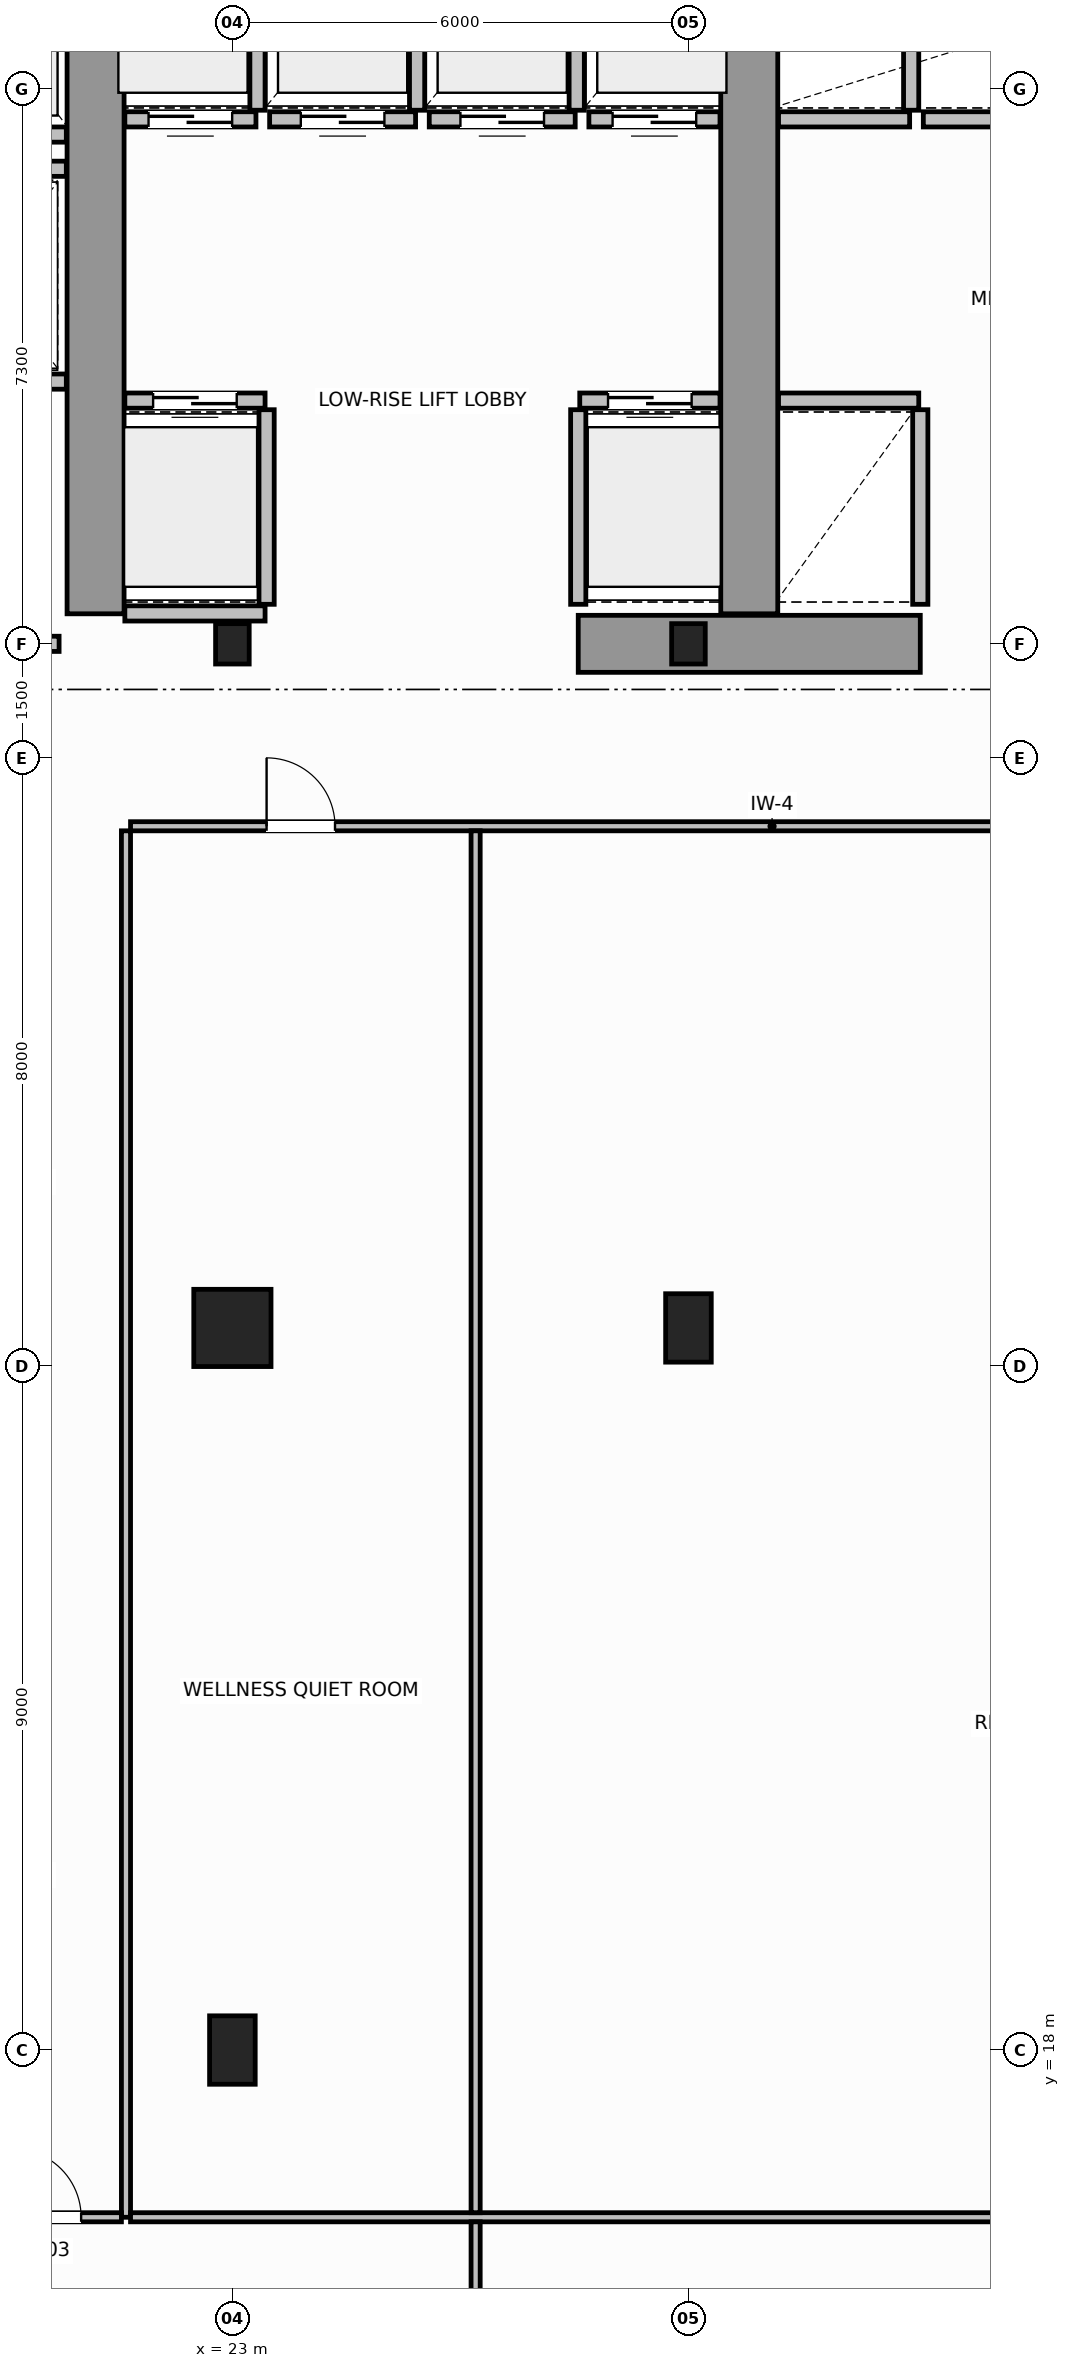
"""IFC4 building model, lengths in metres.
Left out: names, types, materials, properties, quantities, classifications, styles, units other than length and angle.
Written with IfcOpenShell. Run it as: python <this file> out.ifc"""

import sys

from ifc_helpers import new_model, si_unit, direction, frame, frame_2d, origin, origin_2d, place, context, subcontext, project, spatial, rectangle, hollow_rectangle, hollow_circle, i_section, extrude, source, transform, mapped, element, fill, save


model = new_model("IFC4")
c1 = context("Model", 3, precision=1e-05, world=origin(), true_north=direction((0.0, 1.0)))
c2 = subcontext(c1, "Body", "Model", "MODEL_VIEW")
j1 = project(units=[si_unit("LENGTHUNIT", "METRE"), si_unit("PLANEANGLEUNIT", "RADIAN")], contexts=[c1])
p1 = place(None, origin())
s1 = spatial("IfcSite", under=j1, at=p1, CompositionType="ELEMENT")
p2 = place(p1, origin())
s2 = spatial("IfcBuilding", under=s1, at=p2, CompositionType="ELEMENT")
p3 = place(p2, frame((0.0, 0.0, 88.2)))
s3 = spatial("IfcBuildingStorey", under=s2, at=p3, CompositionType="ELEMENT", Elevation=88.2)
m1 = source(origin(), c2, "Body", "SweptSolid", [
    extrude(i_section(OverallWidth=0.442, OverallDepth=0.531, WebThickness=0.065, FlangeThickness=0.076, FilletRadius=0.015, at=origin_2d()), origin(), (0.0, 0.0, 1.0), 3.8),
])
for number, where, z_axis, x_axis in (
    (1, (23.0, 36.5, 0.0), (0.0, 0.0, 1.0), (1.0, 0.0, 0.0)),
    (2, (29.0, 36.5, 0.0), (0.0, 0.0, 1.0), (1.0, 0.0, 0.0)),
):
    element("IfcColumn", number, at=place(p3, frame(where, z_axis=z_axis, x_axis=x_axis)), inside=s3, PredefinedType="COLUMN", context=c2, shape_type="MappedRepresentation", body=[
        mapped(m1, transform((0.0, 0.0, 0.0), scale=1.0)),
    ])
m2 = source(origin(), c2, "Body", "SweptSolid", [
    extrude(hollow_circle(Radius=0.508, WallThickness=0.045, at=origin_2d()), origin(), (0.0, 0.0, 1.0), 3.8),
])
p4 = place(p3, frame((23.0, 27.5, 0.0), z_axis=(0.0, 0.0, 1.0), x_axis=(1.0, 0.0, 0.0)))
e3 = element("IfcColumn", 3, at=p4, inside=s3, PredefinedType="COLUMN", context=c2, shape_type="MappedRepresentation", body=[
    mapped(m2, transform((0.0, 0.0, 0.0), scale=1.0)),
])
m3 = source(origin(), c2, "Body", "SweptSolid", [
    extrude(hollow_rectangle(XDim=0.6, YDim=0.9, WallThickness=0.04, InnerFilletRadius=0.04, OuterFilletRadius=0.08, at=origin_2d()), origin(), (0.0, 0.0, 1.0), 3.8),
])
for number, where, z_axis, x_axis in (
    (4, (29.0, 27.5, 0.0), (0.0, 0.0, 1.0), (1.0, 0.0, 0.0)),
    (5, (23.0, 18.0, 0.0), (0.0, 0.0, 1.0), (1.0, 0.0, 0.0)),
):
    element("IfcColumn", number, at=place(p3, frame(where, z_axis=z_axis, x_axis=x_axis)), inside=s3, PredefinedType="COLUMN", context=c2, shape_type="MappedRepresentation", body=[
        mapped(m3, transform((0.0, 0.0, 0.0), scale=1.0)),
    ])
p5 = place(p3, frame((27.55, 36.5, 0.0), z_axis=(0.0, 0.0, 1.0), x_axis=(1.0, 0.0, 0.0)))
e6 = element("IfcWall", 6, at=p5, inside=s3, PredefinedType="SHEAR", context=c2, shape_type="SweptSolid", body=[
    extrude(rectangle(XDim=4.5, YDim=0.75, at=frame_2d((2.25, 0.0))), origin(), (0.0, 0.0, 1.0), 3.8),
])
for number, where, z_axis, x_axis in (
    (7, (21.2, 36.895, 0.0), (0.0, 0.0, 1.0), (0.0, 1.0, 0.0)),
    (8, (29.8, 36.895, 0.0), (0.0, 0.0, 1.0), (0.0, 1.0, 0.0)),
):
    element("IfcWall", number, at=place(p3, frame(where, z_axis=z_axis, x_axis=x_axis)), inside=s3, PredefinedType="SHEAR", context=c2, shape_type="SweptSolid", body=[
        extrude(rectangle(XDim=9.305, YDim=0.75, at=frame_2d((4.652, 0.0))), origin(), (0.0, 0.0, 1.0), 3.8),
    ])
p6 = place(p3, frame((18.25, 36.5, 0.0), z_axis=(0.0, 0.0, 1.0), x_axis=(1.0, 0.0, 0.0)))
e9 = element("IfcWall", 9, at=p6, inside=s3, PredefinedType="SOLIDWALL", context=c2, shape_type="SweptSolid", body=[
    extrude(rectangle(XDim=2.47, YDim=0.2, at=frame_2d((1.235, 0.0))), origin(), (0.0, 0.0, 1.0), 2.37),
])
p7 = place(p6, frame((0.65, 0.0, 0.0)))
e10 = element("IfcOpeningElement", 10, at=p7, cuts=e9, PredefinedType="OPENING", context=c2, shape_type="SweptSolid", body=[
    extrude(rectangle(XDim=1.1, YDim=2.15, at=frame_2d((0.55, 1.075))), frame((0.0, 0.11, 0.0), z_axis=(0.0, -1.0, 0.0), x_axis=(1.0, 0.0, 0.0)), (0.0, 0.0, 1.0), 0.22),
])
p8 = place(p3, frame((21.585, 39.7, 0.0), z_axis=(0.0, 0.0, 1.0), x_axis=(1.0, 0.0, 0.0)))
e11 = element("IfcWall", 11, at=p8, inside=s3, PredefinedType="SOLIDWALL", context=c2, shape_type="SweptSolid", body=[
    extrude(rectangle(XDim=1.845, YDim=0.2, at=frame_2d((0.922, 0.0))), origin(), (0.0, 0.0, 1.0), 3.58),
])
p9 = place(p8, frame((0.372, 0.0, 0.0)))
e12 = element("IfcOpeningElement", 12, at=p9, cuts=e11, PredefinedType="OPENING", context=c2, shape_type="SweptSolid", body=[
    extrude(rectangle(XDim=1.1, YDim=2.15, at=frame_2d((0.55, 1.075))), frame((0.0, 0.11, 0.0), z_axis=(0.0, -1.0, 0.0), x_axis=(1.0, 0.0, 0.0)), (0.0, 0.0, 1.0), 0.22),
])
p10 = place(p3, frame((21.585, 36.9, 0.0), z_axis=(0.0, 0.0, 1.0), x_axis=(1.0, 0.0, 0.0)))
e13 = element("IfcWall", 13, at=p10, inside=s3, PredefinedType="SOLIDWALL", context=c2, shape_type="SweptSolid", body=[
    extrude(rectangle(XDim=1.845, YDim=0.2, at=frame_2d((0.922, 0.0))), origin(), (0.0, 0.0, 1.0), 2.37),
])
p11 = place(p3, frame((23.45, 37.02, 0.0), z_axis=(0.0, 0.0, 1.0), x_axis=(0.0, 1.0, 0.0)))
e14 = element("IfcWall", 14, at=p11, inside=s3, PredefinedType="SOLIDWALL", context=c2, shape_type="SweptSolid", body=[
    extrude(rectangle(XDim=2.56, YDim=0.2, at=frame_2d((1.28, 0.0))), origin(), (0.0, 0.0, 1.0), 3.58),
])
p12 = place(p3, frame((27.57, 39.7, 0.0), z_axis=(0.0, 0.0, 1.0), x_axis=(1.0, 0.0, 0.0)))
e15 = element("IfcWall", 15, at=p12, inside=s3, PredefinedType="SOLIDWALL", context=c2, shape_type="SweptSolid", body=[
    extrude(rectangle(XDim=1.845, YDim=0.2, at=frame_2d((0.922, 0.0))), origin(), (0.0, 0.0, 1.0), 3.58),
])
p13 = place(p12, frame((0.372, 0.0, 0.0)))
e16 = element("IfcOpeningElement", 16, at=p13, cuts=e15, PredefinedType="OPENING", context=c2, shape_type="SweptSolid", body=[
    extrude(rectangle(XDim=1.1, YDim=2.15, at=frame_2d((0.55, 1.075))), frame((0.0, 0.11, 0.0), z_axis=(0.0, -1.0, 0.0), x_axis=(1.0, 0.0, 0.0)), (0.0, 0.0, 1.0), 0.22),
])
p14 = place(p3, frame((27.55, 37.02, 0.0), z_axis=(0.0, 0.0, 1.0), x_axis=(0.0, 1.0, 0.0)))
e17 = element("IfcWall", 17, at=p14, inside=s3, PredefinedType="SOLIDWALL", context=c2, shape_type="SweptSolid", body=[
    extrude(rectangle(XDim=2.56, YDim=0.2, at=frame_2d((1.28, 0.0))), origin(), (0.0, 0.0, 1.0), 3.58),
])
p15 = place(p3, frame((21.585, 43.4, 0.0), z_axis=(0.0, 0.0, 1.0), x_axis=(1.0, 0.0, 0.0)))
e18 = element("IfcWall", 18, at=p15, inside=s3, PredefinedType="SOLIDWALL", context=c2, shape_type="SweptSolid", body=[
    extrude(rectangle(XDim=1.725, YDim=0.2, at=frame_2d((0.863, 0.0))), origin(), (0.0, 0.0, 1.0), 3.58),
])
p16 = place(p15, frame((0.312, 0.0, 0.0)))
e19 = element("IfcOpeningElement", 19, at=p16, cuts=e18, PredefinedType="OPENING", context=c2, shape_type="SweptSolid", body=[
    extrude(rectangle(XDim=1.1, YDim=2.15, at=frame_2d((0.55, 1.075))), frame((0.0, 0.11, 0.0), z_axis=(0.0, -1.0, 0.0), x_axis=(1.0, 0.0, 0.0)), (0.0, 0.0, 1.0), 0.22),
])
p17 = place(p3, frame((23.33, 43.52, 0.0), z_axis=(0.0, 0.0, 1.0), x_axis=(0.0, 1.0, 0.0)))
e20 = element("IfcWall", 20, at=p17, inside=s3, PredefinedType="SOLIDWALL", context=c2, shape_type="SweptSolid", body=[
    extrude(rectangle(XDim=2.56, YDim=0.2, at=frame_2d((1.28, 0.0))), origin(), (0.0, 0.0, 1.0), 3.58),
])
p18 = place(p3, frame((23.49, 43.4, 0.0), z_axis=(0.0, 0.0, 1.0), x_axis=(1.0, 0.0, 0.0)))
e21 = element("IfcWall", 21, at=p18, inside=s3, PredefinedType="SOLIDWALL", context=c2, shape_type="SweptSolid", body=[
    extrude(rectangle(XDim=1.92, YDim=0.2, at=frame_2d((0.96, 0.0))), origin(), (0.0, 0.0, 1.0), 3.58),
])
p19 = place(p18, frame((0.41, 0.0, 0.0)))
e22 = element("IfcOpeningElement", 22, at=p19, cuts=e21, PredefinedType="OPENING", context=c2, shape_type="SweptSolid", body=[
    extrude(rectangle(XDim=1.1, YDim=2.15, at=frame_2d((0.55, 1.075))), frame((0.0, 0.11, 0.0), z_axis=(0.0, -1.0, 0.0), x_axis=(1.0, 0.0, 0.0)), (0.0, 0.0, 1.0), 0.22),
])
p20 = place(p3, frame((25.43, 43.52, 0.0), z_axis=(0.0, 0.0, 1.0), x_axis=(0.0, 1.0, 0.0)))
e23 = element("IfcWall", 23, at=p20, inside=s3, PredefinedType="SOLIDWALL", context=c2, shape_type="SweptSolid", body=[
    extrude(rectangle(XDim=2.56, YDim=0.2, at=frame_2d((1.28, 0.0))), origin(), (0.0, 0.0, 1.0), 3.58),
])
p21 = place(p3, frame((25.59, 43.4, 0.0), z_axis=(0.0, 0.0, 1.0), x_axis=(1.0, 0.0, 0.0)))
e24 = element("IfcWall", 24, at=p21, inside=s3, PredefinedType="SOLIDWALL", context=c2, shape_type="SweptSolid", body=[
    extrude(rectangle(XDim=1.92, YDim=0.2, at=frame_2d((0.96, 0.0))), origin(), (0.0, 0.0, 1.0), 3.58),
])
p22 = place(p21, frame((0.41, 0.0, 0.0)))
e25 = element("IfcOpeningElement", 25, at=p22, cuts=e24, PredefinedType="OPENING", context=c2, shape_type="SweptSolid", body=[
    extrude(rectangle(XDim=1.1, YDim=2.15, at=frame_2d((0.55, 1.075))), frame((0.0, 0.11, 0.0), z_axis=(0.0, -1.0, 0.0), x_axis=(1.0, 0.0, 0.0)), (0.0, 0.0, 1.0), 0.22),
])
p23 = place(p3, frame((27.53, 43.52, 0.0), z_axis=(0.0, 0.0, 1.0), x_axis=(0.0, 1.0, 0.0)))
e26 = element("IfcWall", 26, at=p23, inside=s3, PredefinedType="SOLIDWALL", context=c2, shape_type="SweptSolid", body=[
    extrude(rectangle(XDim=2.56, YDim=0.2, at=frame_2d((1.28, 0.0))), origin(), (0.0, 0.0, 1.0), 3.58),
])
p24 = place(p3, frame((27.69, 43.4, 0.0), z_axis=(0.0, 0.0, 1.0), x_axis=(1.0, 0.0, 0.0)))
e27 = element("IfcWall", 27, at=p24, inside=s3, PredefinedType="SOLIDWALL", context=c2, shape_type="SweptSolid", body=[
    extrude(rectangle(XDim=1.725, YDim=0.2, at=frame_2d((0.863, 0.0))), origin(), (0.0, 0.0, 1.0), 3.58),
])
p25 = place(p24, frame((0.312, 0.0, 0.0)))
e28 = element("IfcOpeningElement", 28, at=p25, cuts=e27, PredefinedType="OPENING", context=c2, shape_type="SweptSolid", body=[
    extrude(rectangle(XDim=1.1, YDim=2.15, at=frame_2d((0.55, 1.075))), frame((0.0, 0.11, 0.0), z_axis=(0.0, -1.0, 0.0), x_axis=(1.0, 0.0, 0.0)), (0.0, 0.0, 1.0), 0.22),
])
p26 = place(p3, frame((30.185, 39.7, 0.0), z_axis=(0.0, 0.0, 1.0), x_axis=(1.0, 0.0, 0.0)))
e29 = element("IfcWall", 29, at=p26, inside=s3, PredefinedType="SOLIDWALL", context=c2, shape_type="SweptSolid", body=[
    extrude(rectangle(XDim=1.845, YDim=0.2, at=frame_2d((0.922, 0.0))), origin(), (0.0, 0.0, 1.0), 3.58),
])
p27 = place(p3, frame((32.05, 37.02, 0.0), z_axis=(0.0, 0.0, 1.0), x_axis=(0.0, 1.0, 0.0)))
e30 = element("IfcWall", 30, at=p27, inside=s3, PredefinedType="SOLIDWALL", context=c2, shape_type="SweptSolid", body=[
    extrude(rectangle(XDim=2.56, YDim=0.2, at=frame_2d((1.28, 0.0))), origin(), (0.0, 0.0, 1.0), 3.58),
])
p28 = place(p3, frame((30.185, 43.4, 0.0), z_axis=(0.0, 0.0, 1.0), x_axis=(1.0, 0.0, 0.0)))
e31 = element("IfcWall", 31, at=p28, inside=s3, PredefinedType="SOLIDWALL", context=c2, shape_type="SweptSolid", body=[
    extrude(rectangle(XDim=1.725, YDim=0.2, at=frame_2d((0.862, 0.0))), origin(), (0.0, 0.0, 1.0), 3.58),
])
p29 = place(p3, frame((31.93, 43.52, 0.0), z_axis=(0.0, 0.0, 1.0), x_axis=(0.0, 1.0, 0.0)))
e32 = element("IfcWall", 32, at=p29, inside=s3, PredefinedType="SOLIDWALL", context=c2, shape_type="SweptSolid", body=[
    extrude(rectangle(XDim=2.56, YDim=0.2, at=frame_2d((1.28, 0.0))), origin(), (0.0, 0.0, 1.0), 3.58),
])
p30 = place(p3, frame((32.09, 43.4, 0.0), z_axis=(0.0, 0.0, 1.0), x_axis=(1.0, 0.0, 0.0)))
e33 = element("IfcWall", 33, at=p30, inside=s3, PredefinedType="SOLIDWALL", context=c2, shape_type="SweptSolid", body=[
    extrude(rectangle(XDim=1.92, YDim=0.2, at=frame_2d((0.96, 0.0))), origin(), (0.0, 0.0, 1.0), 3.58),
])
p31 = place(p3, frame((18.67, 43.2, 0.0), z_axis=(0.0, 0.0, 1.0), x_axis=(1.0, 0.0, 0.0)))
e34 = element("IfcWall", 34, at=p31, inside=s3, PredefinedType="SOLIDWALL", context=c2, shape_type="SweptSolid", body=[
    extrude(rectangle(XDim=2.145, YDim=0.2, at=frame_2d((1.073, 0.0))), origin(), (0.0, 0.0, 1.0), 3.58),
])
p32 = place(p3, frame((18.67, 39.95, 0.0), z_axis=(0.0, 0.0, 1.0), x_axis=(1.0, 0.0, 0.0)))
e35 = element("IfcWall", 35, at=p32, inside=s3, PredefinedType="SOLIDWALL", context=c2, shape_type="SweptSolid", body=[
    extrude(rectangle(XDim=2.145, YDim=0.2, at=frame_2d((1.073, 0.0))), origin(), (0.0, 0.0, 1.0), 3.58),
])
p33 = place(p32, frame((0.522, 0.0, 0.0)))
e36 = element("IfcOpeningElement", 36, at=p33, cuts=e35, PredefinedType="OPENING", context=c2, shape_type="SweptSolid", body=[
    extrude(rectangle(XDim=1.1, YDim=2.15, at=frame_2d((0.55, 1.075))), frame((0.0, 0.11, 0.0), z_axis=(0.0, -1.0, 0.0), x_axis=(1.0, 0.0, 0.0)), (0.0, 0.0, 1.0), 0.22),
])
p34 = place(p3, frame((18.67, 42.75, 0.0), z_axis=(0.0, 0.0, 1.0), x_axis=(1.0, 0.0, 0.0)))
e37 = element("IfcWall", 37, at=p34, inside=s3, PredefinedType="SOLIDWALL", context=c2, shape_type="SweptSolid", body=[
    extrude(rectangle(XDim=2.145, YDim=0.2, at=frame_2d((1.073, 0.0))), origin(), (0.0, 0.0, 1.0), 3.58),
])
p35 = place(p3, frame((21.66, 34.1, 0.0), z_axis=(0.0, 0.0, 1.0), x_axis=(1.0, 0.0, 0.0)))
e38 = element("IfcWall", 38, at=p35, inside=s3, PredefinedType="PARTITIONING", context=c2, shape_type="SweptSolid", body=[
    extrude(rectangle(XDim=24.68, YDim=0.12, at=frame_2d((12.34, 0.0))), origin(), (0.0, 0.0, 1.0), 3.58),
])
p36 = place(p35, frame((1.79, 0.0, 0.0)))
e39 = element("IfcOpeningElement", 39, at=p36, cuts=e38, PredefinedType="OPENING", context=c2, shape_type="SweptSolid", body=[
    extrude(rectangle(XDim=0.9, YDim=2.15, at=frame_2d((0.45, 1.075))), frame((0.0, 0.07, 0.0), z_axis=(0.0, -1.0, 0.0), x_axis=(1.0, 0.0, 0.0)), (0.0, 0.0, 1.0), 0.14),
])
p37 = place(p35, frame((14.19, 0.0, 0.0)))
e40 = element("IfcOpeningElement", 40, at=p37, cuts=e38, PredefinedType="OPENING", context=c2, shape_type="SweptSolid", body=[
    extrude(rectangle(XDim=0.9, YDim=2.15, at=frame_2d((0.45, 1.075))), frame((0.0, 0.07, 0.0), z_axis=(0.0, -1.0, 0.0), x_axis=(1.0, 0.0, 0.0)), (0.0, 0.0, 1.0), 0.14),
])
p38 = place(p3, frame((21.6, 15.8, 0.0), z_axis=(0.0, 0.0, 1.0), x_axis=(0.0, 1.0, 0.0)))
e41 = element("IfcWall", 41, at=p38, inside=s3, PredefinedType="PARTITIONING", context=c2, shape_type="SweptSolid", body=[
    extrude(rectangle(XDim=18.24, YDim=0.12, at=frame_2d((9.12, 0.0))), origin(), (0.0, 0.0, 1.0), 3.58),
])
p39 = place(p3, frame((19.66, 15.8, 0.0), z_axis=(0.0, 0.0, 1.0), x_axis=(1.0, 0.0, 0.0)))
e42 = element("IfcWall", 42, at=p39, inside=s3, PredefinedType="PARTITIONING", context=c2, shape_type="SweptSolid", body=[
    extrude(rectangle(XDim=1.88, YDim=0.12, at=frame_2d((0.94, 0.0))), origin(), (0.0, 0.0, 1.0), 3.58),
])
p40 = place(p39, frame((0.45, 0.0, 0.0)))
e43 = element("IfcOpeningElement", 43, at=p40, cuts=e42, PredefinedType="OPENING", context=c2, shape_type="SweptSolid", body=[
    extrude(rectangle(XDim=0.9, YDim=2.15, at=frame_2d((0.45, 1.075))), frame((0.0, 0.07, 0.0), z_axis=(0.0, -1.0, 0.0), x_axis=(1.0, 0.0, 0.0)), (0.0, 0.0, 1.0), 0.14),
])
p41 = place(p3, frame((21.66, 15.8, 0.0), z_axis=(0.0, 0.0, 1.0), x_axis=(1.0, 0.0, 0.0)))
e44 = element("IfcWall", 44, at=p41, inside=s3, PredefinedType="PARTITIONING", context=c2, shape_type="SweptSolid", body=[
    extrude(rectangle(XDim=24.68, YDim=0.12, at=frame_2d((12.34, 0.0))), origin(), (0.0, 0.0, 1.0), 3.58),
])
p42 = place(p3, frame((26.2, 15.86, 0.0), z_axis=(0.0, 0.0, 1.0), x_axis=(0.0, 1.0, 0.0)))
e45 = element("IfcWall", 45, at=p42, inside=s3, PredefinedType="PARTITIONING", context=c2, shape_type="SweptSolid", body=[
    extrude(rectangle(XDim=18.18, YDim=0.12, at=frame_2d((9.09, 0.0))), origin(), (0.0, 0.0, 1.0), 3.58),
])
p43 = place(p3, frame((26.2, 3.626, 0.0), z_axis=(0.0, 0.0, 1.0), x_axis=(0.0, 1.0, 0.0)))
e46 = element("IfcWall", 46, at=p43, inside=s3, PredefinedType="PARTITIONING", context=c2, shape_type="SweptSolid", body=[
    extrude(rectangle(XDim=12.114, YDim=0.12, at=frame_2d((6.057, 0.0))), origin(), (0.0, 0.0, 1.0), 3.58),
])
p44 = place(p43, frame((5.607, 0.0, 0.0)))
e47 = element("IfcOpeningElement", 47, at=p44, cuts=e46, PredefinedType="OPENING", context=c2, shape_type="SweptSolid", body=[
    extrude(rectangle(XDim=0.9, YDim=2.15, at=frame_2d((0.45, 1.075))), frame((0.0, 0.07, 0.0), z_axis=(0.0, -1.0, 0.0), x_axis=(1.0, 0.0, 0.0)), (0.0, 0.0, 1.0), 0.14),
])
m4 = source(origin(), c2, "Body", "SweptSolid", [
    extrude(rectangle(XDim=1.1, YDim=2.15, at=frame_2d((0.55, 1.075))), frame((0.0, 0.025, 0.0), z_axis=(0.0, -1.0, 0.0), x_axis=(1.0, 0.0, 0.0)), (0.0, 0.0, 1.0), 0.05),
])
p45 = place(p9, origin())
e48 = element("IfcDoor", 48, at=p45, inside=s3, OperationType="DOUBLE_DOOR_SLIDING", PredefinedType="DOOR", context=c2, shape_type="MappedRepresentation", body=[
    mapped(m4, transform((0.0, 0.0, 0.0), scale=1.0)),
])
fill(e12, e48)
p46 = place(p13, origin())
e49 = element("IfcDoor", 49, at=p46, inside=s3, OperationType="DOUBLE_DOOR_SLIDING", PredefinedType="DOOR", context=c2, shape_type="MappedRepresentation", body=[
    mapped(m4, transform((0.0, 0.0, 0.0), scale=1.0)),
])
fill(e16, e49)
p47 = place(p16, origin())
e50 = element("IfcDoor", 50, at=p47, inside=s3, OperationType="DOUBLE_DOOR_SLIDING", PredefinedType="DOOR", context=c2, shape_type="MappedRepresentation", body=[
    mapped(m4, transform((0.0, 0.0, 0.0), scale=1.0)),
])
fill(e19, e50)
p48 = place(p19, origin())
e51 = element("IfcDoor", 51, at=p48, inside=s3, OperationType="DOUBLE_DOOR_SLIDING", PredefinedType="DOOR", context=c2, shape_type="MappedRepresentation", body=[
    mapped(m4, transform((0.0, 0.0, 0.0), scale=1.0)),
])
fill(e22, e51)
p49 = place(p22, origin())
e52 = element("IfcDoor", 52, at=p49, inside=s3, OperationType="DOUBLE_DOOR_SLIDING", PredefinedType="DOOR", context=c2, shape_type="MappedRepresentation", body=[
    mapped(m4, transform((0.0, 0.0, 0.0), scale=1.0)),
])
fill(e25, e52)
p50 = place(p25, origin())
e53 = element("IfcDoor", 53, at=p50, inside=s3, OperationType="DOUBLE_DOOR_SLIDING", PredefinedType="DOOR", context=c2, shape_type="MappedRepresentation", body=[
    mapped(m4, transform((0.0, 0.0, 0.0), scale=1.0)),
])
fill(e28, e53)
m5 = source(origin(), c2, "Body", "SweptSolid", [
    extrude(rectangle(XDim=0.9, YDim=2.15, at=frame_2d((0.45, 1.075))), frame((0.0, 0.025, 0.0), z_axis=(0.0, -1.0, 0.0), x_axis=(1.0, 0.0, 0.0)), (0.0, 0.0, 1.0), 0.05),
])
p51 = place(p36, origin())
e54 = element("IfcDoor", 54, at=p51, inside=s3, OperationType="SINGLE_SWING_LEFT", PredefinedType="DOOR", context=c2, shape_type="MappedRepresentation", body=[
    mapped(m5, transform((0.0, 0.0, 0.0), scale=1.0)),
])
fill(e39, e54)
p52 = place(p40, origin())
e55 = element("IfcDoor", 55, at=p52, inside=s3, OperationType="SINGLE_SWING_LEFT", PredefinedType="DOOR", context=c2, shape_type="MappedRepresentation", body=[
    mapped(m5, transform((0.0, 0.0, 0.0), scale=1.0)),
])
fill(e43, e55)
save(model, sys.argv[1])
